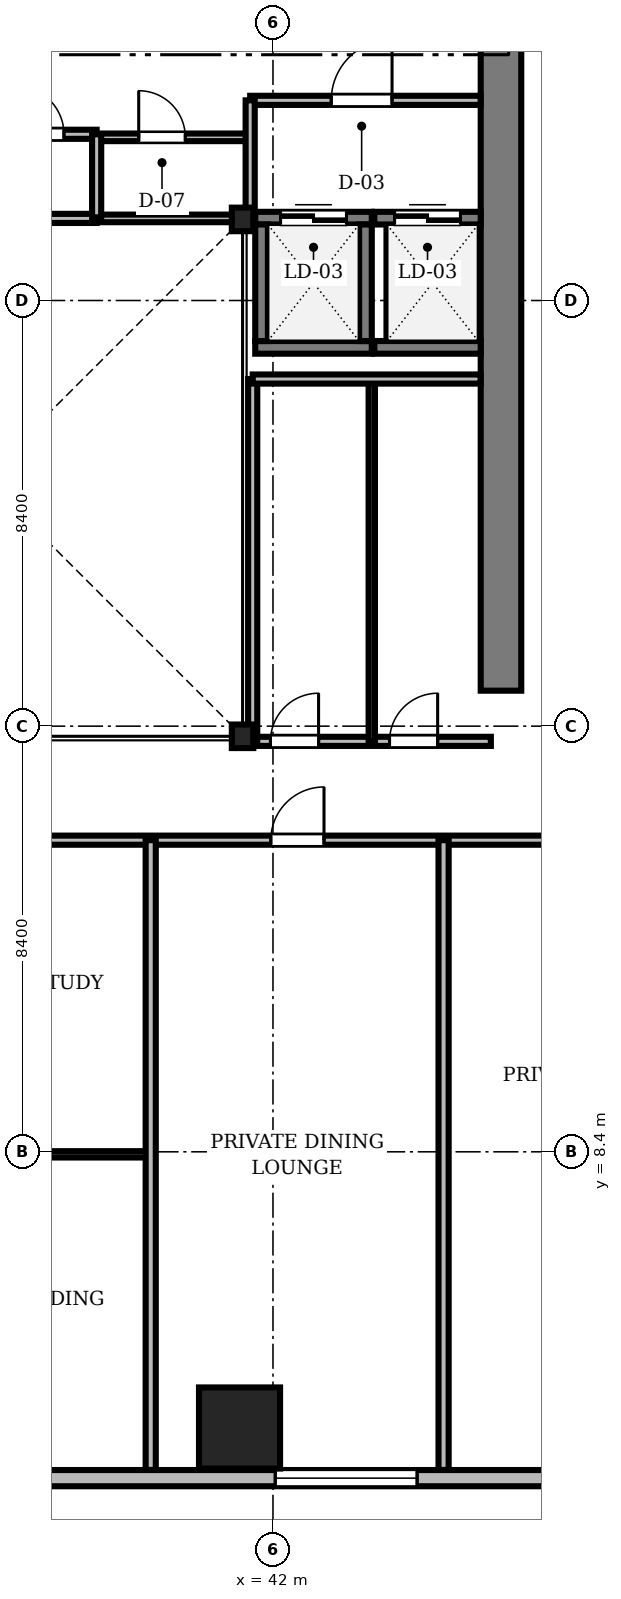
"""IFC4 building model, lengths in metres.
Left out: names, types, materials, properties, quantities, classifications, styles, units other than length and angle.
Written with IfcOpenShell. Run it as: python <this file> out.ifc"""

import sys

from ifc_helpers import new_model, si_unit, direction, frame, frame_2d, origin, origin_2d, place, context, subcontext, project, spatial, rectangle, i_section, extrude, source, transform, mapped, element, fill, save


model = new_model("IFC4")
c1 = context("Model", 3, precision=1e-05, world=origin(), true_north=direction((0.0, 1.0)))
c2 = subcontext(c1, "Body", "Model", "MODEL_VIEW")
j1 = project(units=[si_unit("LENGTHUNIT", "METRE"), si_unit("PLANEANGLEUNIT", "RADIAN")], contexts=[c1])
p1 = place(None, origin())
s1 = spatial("IfcSite", under=j1, at=p1, CompositionType="ELEMENT")
p2 = place(p1, origin())
s2 = spatial("IfcBuilding", under=s1, at=p2, CompositionType="ELEMENT")
p3 = place(p2, frame((0.0, 0.0, 148.3)))
s3 = spatial("IfcBuildingStorey", under=s2, at=p3, CompositionType="ELEMENT", Elevation=148.3)
m1 = source(origin(), c2, "Body", "SweptSolid", [
    extrude(rectangle(XDim=13.15, YDim=0.8, at=frame_2d((6.575, 0.0))), origin(), (0.0, 0.0, 1.0), 3.46),
])
p4 = place(p3, frame((46.5, 17.5, 0.0), z_axis=(0.0, 0.0, 1.0), x_axis=(0.0, 1.0, 0.0)))
e1 = element("IfcWall", 1, at=p4, inside=s3, PredefinedType="SHEAR", context=c2, shape_type="MappedRepresentation", body=[
    mapped(m1, transform((0.0, 0.0, 0.0), scale=1.0)),
])
m2 = source(origin(), c2, "Body", "SweptSolid", [
    extrude(i_section(OverallWidth=0.424, OverallDepth=0.465, WebThickness=0.035, FlangeThickness=0.056, FilletRadius=0.015, at=origin_2d()), origin(), (0.0, 0.0, 1.0), 3.46),
])
for number, where, z_axis, x_axis in (
    (2, (41.4, 16.6, 0.0), (0.0, 0.0, 1.0), (1.0, 0.0, 0.0)),
    (3, (41.4, 26.8, 0.0), (0.0, 0.0, 1.0), (1.0, 0.0, 0.0)),
):
    element("IfcColumn", number, at=place(p3, frame(where, z_axis=z_axis, x_axis=x_axis)), inside=s3, PredefinedType="COLUMN", context=c2, shape_type="MappedRepresentation", body=[
        mapped(m2, transform((0.0, 0.0, 0.0), scale=1.0)),
    ])
m3 = source(origin(), c2, "Body", "SweptSolid", [
    extrude(rectangle(XDim=1.6, YDim=1.6, at=origin_2d()), origin(), (0.0, 0.0, 1.0), 3.46),
])
p5 = place(p3, frame((41.34, 2.95, 0.0), z_axis=(0.0, 0.0, 1.0), x_axis=(1.0, 0.0, 0.0)))
e4 = element("IfcColumn", 4, at=p5, inside=s3, PredefinedType="COLUMN", context=c2, shape_type="MappedRepresentation", body=[
    mapped(m3, transform((0.0, 0.0, 0.0), scale=1.0)),
])
m4 = source(origin(), c2, "Body", "SweptSolid", [
    extrude(rectangle(XDim=15.6, YDim=0.32, at=frame_2d((7.8, 0.0))), origin(), (0.0, 0.0, 1.0), 3.46),
])
p6 = place(p3, frame((33.3, 1.96, 0.0), z_axis=(0.0, 0.0, 1.0), x_axis=(1.0, 0.0, 0.0)))
e5 = element("IfcWall", 5, at=p6, inside=s3, PredefinedType="SOLIDWALL", context=c2, shape_type="MappedRepresentation", body=[
    mapped(m4, transform((0.0, 0.0, 0.0), scale=1.0)),
])
m5 = source(origin(), c2, "Body", "SweptSolid", [
    extrude(rectangle(XDim=2.8, YDim=2.4, at=frame_2d((1.4, 1.2))), frame((0.0, 0.17, 0.0), z_axis=(0.0, -1.0, 0.0), x_axis=(1.0, 0.0, 0.0)), (0.0, 0.0, 1.0), 0.34),
])
p7 = place(p6, frame((8.745, 0.0, 0.72)))
e6 = element("IfcOpeningElement", 6, at=p7, cuts=e5, PredefinedType="OPENING", context=c2, shape_type="MappedRepresentation", body=[
    mapped(m5, transform((0.0, 0.0, 0.0), scale=1.0)),
])
m6 = source(origin(), c2, "Body", "SweptSolid", [
    extrude(rectangle(XDim=2.3, YDim=0.25, at=frame_2d((1.15, 0.0))), origin(), (0.0, 0.0, 1.0), 3.46),
])
p8 = place(p3, frame((41.65, 24.275, 0.0), z_axis=(0.0, 0.0, 1.0), x_axis=(1.0, 0.0, 0.0)))
e7 = element("IfcWall", 7, at=p8, inside=s3, PredefinedType="SOLIDWALL", context=c2, shape_type="MappedRepresentation", body=[
    mapped(m6, transform((0.0, 0.0, 0.0), scale=1.0)),
])
p9 = place(p3, frame((41.65, 26.825, 0.0), z_axis=(0.0, 0.0, 1.0), x_axis=(1.0, 0.0, 0.0)))
e8 = element("IfcWall", 8, at=p9, inside=s3, PredefinedType="SOLIDWALL", context=c2, shape_type="MappedRepresentation", body=[
    mapped(m6, transform((0.0, 0.0, 0.0), scale=1.0)),
])
m7 = source(origin(), c2, "Body", "SweptSolid", [
    extrude(rectangle(XDim=1.3, YDim=2.3, at=frame_2d((0.65, 1.15))), frame((0.0, 0.135, 0.0), z_axis=(0.0, -1.0, 0.0), x_axis=(1.0, 0.0, 0.0)), (0.0, 0.0, 1.0), 0.27),
])
p10 = place(p9, frame((0.5, 0.0, 0.0)))
e9 = element("IfcOpeningElement", 9, at=p10, cuts=e8, PredefinedType="OPENING", context=c2, shape_type="MappedRepresentation", body=[
    mapped(m7, transform((0.0, 0.0, 0.0), scale=1.0)),
])
for number, where, z_axis, x_axis in (
    (10, (41.775, 24.4, 0.0), (0.0, 0.0, 1.0), (0.0, 1.0, 0.0)),
    (11, (43.825, 24.4, 0.0), (0.0, 0.0, 1.0), (0.0, 1.0, 0.0)),
):
    element("IfcWall", number, at=place(p3, frame(where, z_axis=z_axis, x_axis=x_axis)), inside=s3, PredefinedType="SOLIDWALL", context=c2, shape_type="MappedRepresentation", body=[
        mapped(m6, transform((0.0, 0.0, 0.0), scale=1.0)),
    ])
m8 = source(origin(), c2, "Body", "SweptSolid", [
    extrude(rectangle(XDim=2.1, YDim=0.25, at=frame_2d((1.05, 0.0))), origin(), (0.0, 0.0, 1.0), 3.46),
])
p11 = place(p3, frame((44.0, 24.275, 0.0), z_axis=(0.0, 0.0, 1.0), x_axis=(1.0, 0.0, 0.0)))
e12 = element("IfcWall", 12, at=p11, inside=s3, PredefinedType="SOLIDWALL", context=c2, shape_type="MappedRepresentation", body=[
    mapped(m8, transform((0.0, 0.0, 0.0), scale=1.0)),
])
p12 = place(p3, frame((44.0, 26.825, 0.0), z_axis=(0.0, 0.0, 1.0), x_axis=(1.0, 0.0, 0.0)))
e13 = element("IfcWall", 13, at=p12, inside=s3, PredefinedType="SOLIDWALL", context=c2, shape_type="MappedRepresentation", body=[
    mapped(m8, transform((0.0, 0.0, 0.0), scale=1.0)),
])
p13 = place(p12, frame((0.4, 0.0, 0.0)))
e14 = element("IfcOpeningElement", 14, at=p13, cuts=e13, PredefinedType="OPENING", context=c2, shape_type="MappedRepresentation", body=[
    mapped(m7, transform((0.0, 0.0, 0.0), scale=1.0)),
])
m9 = source(origin(), c2, "Body", "SweptSolid", [
    extrude(rectangle(XDim=46.156, YDim=0.18, at=frame_2d((23.078, 0.0))), origin(), (0.0, 0.0, 1.0), 2.702),
])
p14 = place(p3, frame((6.922, 14.55, 0.0), z_axis=(0.0, 0.0, 1.0), x_axis=(1.0, 0.0, 0.0)))
e15 = element("IfcWall", 15, at=p14, inside=s3, PredefinedType="PARTITIONING", context=c2, shape_type="MappedRepresentation", body=[
    mapped(m9, transform((0.0, 0.0, 0.0), scale=1.0)),
])
m10 = source(origin(), c2, "Body", "SweptSolid", [
    extrude(rectangle(XDim=1.05, YDim=2.2, at=frame_2d((0.525, 1.1))), frame((0.0, 0.1, 0.0), z_axis=(0.0, -1.0, 0.0), x_axis=(1.0, 0.0, 0.0)), (0.0, 0.0, 1.0), 0.2),
])
p15 = place(p14, frame((14.338, 0.0, 0.0)))
e16 = element("IfcOpeningElement", 16, at=p15, cuts=e15, PredefinedType="OPENING", context=c2, shape_type="MappedRepresentation", body=[
    mapped(m10, transform((0.0, 0.0, 0.0), scale=1.0)),
])
p16 = place(p14, frame((17.878, 0.0, 0.0)))
e17 = element("IfcOpeningElement", 17, at=p16, cuts=e15, PredefinedType="OPENING", context=c2, shape_type="MappedRepresentation", body=[
    mapped(m10, transform((0.0, 0.0, 0.0), scale=1.0)),
])
p17 = place(p14, frame((23.477, 0.0, 0.0)))
e18 = element("IfcOpeningElement", 18, at=p17, cuts=e15, PredefinedType="OPENING", context=c2, shape_type="MappedRepresentation", body=[
    mapped(m10, transform((0.0, 0.0, 0.0), scale=1.0)),
])
p18 = place(p14, frame((29.256, 0.0, 0.0)))
e19 = element("IfcOpeningElement", 19, at=p18, cuts=e15, PredefinedType="OPENING", context=c2, shape_type="MappedRepresentation", body=[
    mapped(m10, transform((0.0, 0.0, 0.0), scale=1.0)),
])
p19 = place(p14, frame((35.035, 0.0, 0.0)))
e20 = element("IfcOpeningElement", 20, at=p19, cuts=e15, PredefinedType="OPENING", context=c2, shape_type="MappedRepresentation", body=[
    mapped(m10, transform((0.0, 0.0, 0.0), scale=1.0)),
])
p20 = place(p14, frame((41.766, 0.0, 0.0)))
e21 = element("IfcOpeningElement", 21, at=p20, cuts=e15, PredefinedType="OPENING", context=c2, shape_type="MappedRepresentation", body=[
    mapped(m10, transform((0.0, 0.0, 0.0), scale=1.0)),
])
m11 = source(origin(), c2, "Body", "SweptSolid", [
    extrude(rectangle(XDim=5.779, YDim=0.125, at=frame_2d((2.889, 0.0))), origin(), (0.0, 0.0, 1.0), 2.852),
])
p21 = place(p3, frame((33.808, 8.35, 0.0), z_axis=(0.0, 0.0, 1.0), x_axis=(1.0, 0.0, 0.0)))
e22 = element("IfcWall", 22, at=p21, inside=s3, PredefinedType="PARTITIONING", context=c2, shape_type="MappedRepresentation", body=[
    mapped(m11, transform((0.0, 0.0, 0.0), scale=1.0)),
])
m12 = source(origin(), c2, "Body", "SweptSolid", [
    extrude(rectangle(XDim=0.95, YDim=2.15, at=frame_2d((0.475, 1.075))), frame((0.0, 0.073, 0.0), z_axis=(0.0, -1.0, 0.0), x_axis=(1.0, 0.0, 0.0)), (0.0, 0.0, 1.0), 0.145),
])
p22 = place(p21, frame((2.41, 0.0, 0.0)))
e23 = element("IfcOpeningElement", 23, at=p22, cuts=e22, PredefinedType="OPENING", context=c2, shape_type="MappedRepresentation", body=[
    mapped(m12, transform((0.0, 0.0, 0.0), scale=1.0)),
])
m13 = source(origin(), c2, "Body", "SweptSolid", [
    extrude(rectangle(XDim=4.548, YDim=0.18, at=frame_2d((2.274, 0.0))), origin(), (0.0, 0.0, 1.0), 3.092),
])
p23 = place(p3, frame((41.55, 29.15, 0.0), z_axis=(0.0, 0.0, 1.0), x_axis=(1.0, 0.0, 0.0)))
e24 = element("IfcWall", 24, at=p23, inside=s3, PredefinedType="PARTITIONING", context=c2, shape_type="MappedRepresentation", body=[
    mapped(m13, transform((0.0, 0.0, 0.0), scale=1.0)),
])
m14 = source(origin(), c2, "Body", "SweptSolid", [
    extrude(rectangle(XDim=1.2, YDim=2.2, at=frame_2d((0.6, 1.1))), frame((0.0, 0.1, 0.0), z_axis=(0.0, -1.0, 0.0), x_axis=(1.0, 0.0, 0.0)), (0.0, 0.0, 1.0), 0.2),
])
p24 = place(p23, frame((1.6, 0.0, 0.0)))
e25 = element("IfcOpeningElement", 25, at=p24, cuts=e24, PredefinedType="OPENING", context=c2, shape_type="MappedRepresentation", body=[
    mapped(m14, transform((0.0, 0.0, 0.0), scale=1.0)),
])
m15 = source(origin(), c2, "Body", "SweptSolid", [
    extrude(rectangle(XDim=4.7, YDim=0.18, at=frame_2d((2.35, 0.0))), origin(), (0.0, 0.0, 1.0), 2.852),
])
p25 = place(p3, frame((41.6, 16.5, 0.0), z_axis=(0.0, 0.0, 1.0), x_axis=(1.0, 0.0, 0.0)))
e26 = element("IfcWall", 26, at=p25, inside=s3, PredefinedType="PARTITIONING", context=c2, shape_type="MappedRepresentation", body=[
    mapped(m15, transform((0.0, 0.0, 0.0), scale=1.0)),
])
m16 = source(origin(), c2, "Body", "SweptSolid", [
    extrude(rectangle(XDim=0.95, YDim=2.15, at=frame_2d((0.475, 1.075))), frame((0.0, 0.1, 0.0), z_axis=(0.0, -1.0, 0.0), x_axis=(1.0, 0.0, 0.0)), (0.0, 0.0, 1.0), 0.2),
])
p26 = place(p25, frame((0.35, 0.0, 0.0)))
e27 = element("IfcOpeningElement", 27, at=p26, cuts=e26, PredefinedType="OPENING", context=c2, shape_type="MappedRepresentation", body=[
    mapped(m16, transform((0.0, 0.0, 0.0), scale=1.0)),
])
p27 = place(p25, frame((2.7, 0.0, 0.0)))
e28 = element("IfcOpeningElement", 28, at=p27, cuts=e26, PredefinedType="OPENING", context=c2, shape_type="MappedRepresentation", body=[
    mapped(m16, transform((0.0, 0.0, 0.0), scale=1.0)),
])
m17 = source(origin(), c2, "Body", "SweptSolid", [
    extrude(rectangle(XDim=3.37, YDim=0.18, at=frame_2d((1.685, 0.0))), origin(), (0.0, 0.0, 1.0), 3.46),
])
p28 = place(p3, frame((35.15, 28.48, 0.0), z_axis=(0.0, 0.0, 1.0), x_axis=(1.0, 0.0, 0.0)))
e29 = element("IfcWall", 29, at=p28, inside=s3, PredefinedType="PARTITIONING", context=c2, shape_type="MappedRepresentation", body=[
    mapped(m17, transform((0.0, 0.0, 0.0), scale=1.0)),
])
p29 = place(p28, frame((1.775, 0.0, 0.0)))
e30 = element("IfcOpeningElement", 30, at=p29, cuts=e29, PredefinedType="OPENING", context=c2, shape_type="MappedRepresentation", body=[
    mapped(m16, transform((0.0, 0.0, 0.0), scale=1.0)),
])
m18 = source(origin(), c2, "Body", "SweptSolid", [
    extrude(rectangle(XDim=3.0, YDim=0.15, at=frame_2d((1.5, 0.0))), origin(), (0.0, 0.0, 1.0), 3.46),
])
p30 = place(p3, frame((38.52, 28.42, 0.0), z_axis=(0.0, 0.0, 1.0), x_axis=(1.0, 0.0, 0.0)))
e31 = element("IfcWall", 31, at=p30, inside=s3, PredefinedType="PARTITIONING", context=c2, shape_type="MappedRepresentation", body=[
    mapped(m18, transform((0.0, 0.0, 0.0), scale=1.0)),
])
m19 = source(origin(), c2, "Body", "SweptSolid", [
    extrude(rectangle(XDim=0.92, YDim=2.1, at=frame_2d((0.46, 1.05))), frame((0.0, 0.085, 0.0), z_axis=(0.0, -1.0, 0.0), x_axis=(1.0, 0.0, 0.0)), (0.0, 0.0, 1.0), 0.17),
])
p31 = place(p30, frame((0.83, 0.0, 0.0)))
e32 = element("IfcOpeningElement", 32, at=p31, cuts=e31, PredefinedType="OPENING", context=c2, shape_type="MappedRepresentation", body=[
    mapped(m19, transform((0.0, 0.0, 0.0), scale=1.0)),
])
m20 = source(origin(), c2, "Body", "SweptSolid", [
    extrude(rectangle(XDim=12.428, YDim=0.2, at=frame_2d((6.214, 0.0))), origin(), (0.0, 0.0, 1.0), 2.702),
])
for number, where, z_axis, x_axis in (
    (33, (39.587, 2.122, 0.0), (0.0, 0.0, 1.0), (0.0, 1.0, 0.0)),
    (34, (45.367, 2.122, 0.0), (0.0, 0.0, 1.0), (0.0, 1.0, 0.0)),
):
    element("IfcWall", number, at=place(p3, frame(where, z_axis=z_axis, x_axis=x_axis)), inside=s3, PredefinedType="PARTITIONING", context=c2, shape_type="MappedRepresentation", body=[
        mapped(m20, transform((0.0, 0.0, 0.0), scale=1.0)),
    ])
m21 = source(origin(), c2, "Body", "SweptSolid", [
    extrude(rectangle(XDim=7.15, YDim=0.18, at=frame_2d((3.575, 0.0))), origin(), (0.0, 0.0, 1.0), 2.852),
])
p32 = place(p3, frame((41.6, 16.5, 0.0), z_axis=(0.0, 0.0, 1.0), x_axis=(0.0, 1.0, 0.0)))
e35 = element("IfcWall", 35, at=p32, inside=s3, PredefinedType="PARTITIONING", context=c2, shape_type="MappedRepresentation", body=[
    mapped(m21, transform((0.0, 0.0, 0.0), scale=1.0)),
])
m22 = source(origin(), c2, "Body", "SweptSolid", [
    extrude(rectangle(XDim=7.15, YDim=0.125, at=frame_2d((3.575, 0.0))), origin(), (0.0, 0.0, 1.0), 2.852),
])
p33 = place(p3, frame((43.95, 16.5, 0.0), z_axis=(0.0, 0.0, 1.0), x_axis=(0.0, 1.0, 0.0)))
e36 = element("IfcWall", 36, at=p33, inside=s3, PredefinedType="PARTITIONING", context=c2, shape_type="MappedRepresentation", body=[
    mapped(m22, transform((0.0, 0.0, 0.0), scale=1.0)),
])
m23 = source(origin(), c2, "Body", "SweptSolid", [
    extrude(rectangle(XDim=4.498, YDim=0.18, at=frame_2d((2.249, 0.0))), origin(), (0.0, 0.0, 1.0), 3.46),
])
p34 = place(p3, frame((41.6, 23.65, 0.0), z_axis=(0.0, 0.0, 1.0), x_axis=(1.0, 0.0, 0.0)))
e37 = element("IfcWall", 37, at=p34, inside=s3, PredefinedType="PARTITIONING", context=c2, shape_type="MappedRepresentation", body=[
    mapped(m23, transform((0.0, 0.0, 0.0), scale=1.0)),
])
m24 = source(origin(), c2, "Body", "SweptSolid", [
    extrude(rectangle(XDim=3.37, YDim=0.18, at=frame_2d((1.685, 0.0))), origin(), (0.0, 0.0, 1.0), 3.002),
])
p35 = place(p3, frame((35.15, 26.82, 0.0), z_axis=(0.0, 0.0, 1.0), x_axis=(1.0, 0.0, 0.0)))
e38 = element("IfcWall", 38, at=p35, inside=s3, PredefinedType="PARTITIONING", context=c2, shape_type="MappedRepresentation", body=[
    mapped(m24, transform((0.0, 0.0, 0.0), scale=1.0)),
])
m25 = source(origin(), c2, "Body", "SweptSolid", [
    extrude(rectangle(XDim=3.0, YDim=0.15, at=frame_2d((1.5, 0.0))), origin(), (0.0, 0.0, 1.0), 2.852),
])
p36 = place(p3, frame((38.52, 26.82, 0.0), z_axis=(0.0, 0.0, 1.0), x_axis=(1.0, 0.0, 0.0)))
e39 = element("IfcWall", 39, at=p36, inside=s3, PredefinedType="PARTITIONING", context=c2, shape_type="MappedRepresentation", body=[
    mapped(m25, transform((0.0, 0.0, 0.0), scale=1.0)),
])
m26 = source(origin(), c2, "Body", "SweptSolid", [
    extrude(rectangle(XDim=2.35, YDim=0.18, at=frame_2d((1.175, 0.0))), origin(), (0.0, 0.0, 1.0), 2.852),
])
p37 = place(p3, frame((41.55, 26.8, 0.0), z_axis=(0.0, 0.0, 1.0), x_axis=(0.0, 1.0, 0.0)))
e40 = element("IfcWall", 40, at=p37, inside=s3, PredefinedType="PARTITIONING", context=c2, shape_type="MappedRepresentation", body=[
    mapped(m26, transform((0.0, 0.0, 0.0), scale=1.0)),
])
m27 = source(origin(), c2, "Body", "SweptSolid", [
    extrude(rectangle(XDim=1.66, YDim=0.18, at=frame_2d((0.83, 0.0))), origin(), (0.0, 0.0, 1.0), 3.002),
])
p38 = place(p3, frame((38.52, 26.82, 0.0), z_axis=(0.0, 0.0, 1.0), x_axis=(0.0, 1.0, 0.0)))
e41 = element("IfcWall", 41, at=p38, inside=s3, PredefinedType="PARTITIONING", context=c2, shape_type="MappedRepresentation", body=[
    mapped(m27, transform((0.0, 0.0, 0.0), scale=1.0)),
])
m28 = source(origin(), c2, "Body", "SweptSolid", [
    extrude(rectangle(XDim=2.8, YDim=2.4, at=frame_2d((1.4, 1.2))), frame((0.0, 0.03, 0.0), z_axis=(0.0, -1.0, 0.0), x_axis=(1.0, 0.0, 0.0)), (0.0, 0.0, 1.0), 0.06),
])
p39 = place(p7, origin())
e42 = element("IfcWindow", 42, at=p39, inside=s3, PartitioningType="SINGLE_PANEL", PredefinedType="WINDOW", context=c2, shape_type="MappedRepresentation", body=[
    mapped(m28, transform((0.0, 0.0, 0.0), scale=1.0)),
])
fill(e6, e42)
m29 = source(origin(), c2, "Body", "SweptSolid", [
    extrude(rectangle(XDim=1.3, YDim=2.3, at=frame_2d((0.65, 1.15))), frame((0.0, 0.025, 0.0), z_axis=(0.0, -1.0, 0.0), x_axis=(1.0, 0.0, 0.0)), (0.0, 0.0, 1.0), 0.05),
])
p40 = place(p10, origin())
e43 = element("IfcDoor", 43, at=p40, inside=s3, OperationType="DOUBLE_DOOR_SLIDING", PredefinedType="DOOR", context=c2, shape_type="MappedRepresentation", body=[
    mapped(m29, transform((0.0, 0.0, 0.0), scale=1.0)),
])
fill(e9, e43)
p41 = place(p13, origin())
e44 = element("IfcDoor", 44, at=p41, inside=s3, OperationType="DOUBLE_DOOR_SLIDING", PredefinedType="DOOR", context=c2, shape_type="MappedRepresentation", body=[
    mapped(m29, transform((0.0, 0.0, 0.0), scale=1.0)),
])
fill(e14, e44)
m30 = source(origin(), c2, "Body", "SweptSolid", [
    extrude(rectangle(XDim=1.05, YDim=2.2, at=frame_2d((0.525, 1.1))), frame((0.0, 0.025, 0.0), z_axis=(0.0, -1.0, 0.0), x_axis=(1.0, 0.0, 0.0)), (0.0, 0.0, 1.0), 0.05),
])
p42 = place(p19, origin())
e45 = element("IfcDoor", 45, at=p42, inside=s3, OperationType="SINGLE_SWING_RIGHT", PredefinedType="DOOR", context=c2, shape_type="MappedRepresentation", body=[
    mapped(m30, transform((0.0, 0.0, 0.0), scale=1.0)),
])
fill(e20, e45)
m31 = source(origin(), c2, "Body", "SweptSolid", [
    extrude(rectangle(XDim=1.2, YDim=2.2, at=frame_2d((0.6, 1.1))), frame((0.0, 0.025, 0.0), z_axis=(0.0, -1.0, 0.0), x_axis=(1.0, 0.0, 0.0)), (0.0, 0.0, 1.0), 0.05),
])
p43 = place(p24, origin())
e46 = element("IfcDoor", 46, at=p43, inside=s3, OperationType="SINGLE_SWING_RIGHT", PredefinedType="DOOR", context=c2, shape_type="MappedRepresentation", body=[
    mapped(m31, transform((0.0, 0.0, 0.0), scale=1.0)),
])
fill(e25, e46)
m32 = source(origin(), c2, "Body", "SweptSolid", [
    extrude(rectangle(XDim=0.95, YDim=2.15, at=frame_2d((0.475, 1.075))), frame((0.0, 0.025, 0.0), z_axis=(0.0, -1.0, 0.0), x_axis=(1.0, 0.0, 0.0)), (0.0, 0.0, 1.0), 0.05),
])
p44 = place(p26, origin())
e47 = element("IfcDoor", 47, at=p44, inside=s3, OperationType="SINGLE_SWING_RIGHT", PredefinedType="DOOR", context=c2, shape_type="MappedRepresentation", body=[
    mapped(m32, transform((0.0, 0.0, 0.0), scale=1.0)),
])
fill(e27, e47)
p45 = place(p27, origin())
e48 = element("IfcDoor", 48, at=p45, inside=s3, OperationType="SINGLE_SWING_RIGHT", PredefinedType="DOOR", context=c2, shape_type="MappedRepresentation", body=[
    mapped(m32, transform((0.0, 0.0, 0.0), scale=1.0)),
])
fill(e28, e48)
p46 = place(p29, origin())
e49 = element("IfcDoor", 49, at=p46, inside=s3, OperationType="SINGLE_SWING_LEFT", PredefinedType="DOOR", context=c2, shape_type="MappedRepresentation", body=[
    mapped(m32, transform((0.0, 0.0, 0.0), scale=1.0)),
])
fill(e30, e49)
m33 = source(origin(), c2, "Body", "SweptSolid", [
    extrude(rectangle(XDim=0.92, YDim=2.1, at=frame_2d((0.46, 1.05))), frame((0.0, 0.025, 0.0), z_axis=(0.0, -1.0, 0.0), x_axis=(1.0, 0.0, 0.0)), (0.0, 0.0, 1.0), 0.05),
])
p47 = place(p31, origin())
e50 = element("IfcDoor", 50, at=p47, inside=s3, OperationType="SINGLE_SWING_LEFT", PredefinedType="DOOR", context=c2, shape_type="MappedRepresentation", body=[
    mapped(m33, transform((0.0, 0.0, 0.0), scale=1.0)),
])
fill(e32, e50)
save(model, sys.argv[1])
